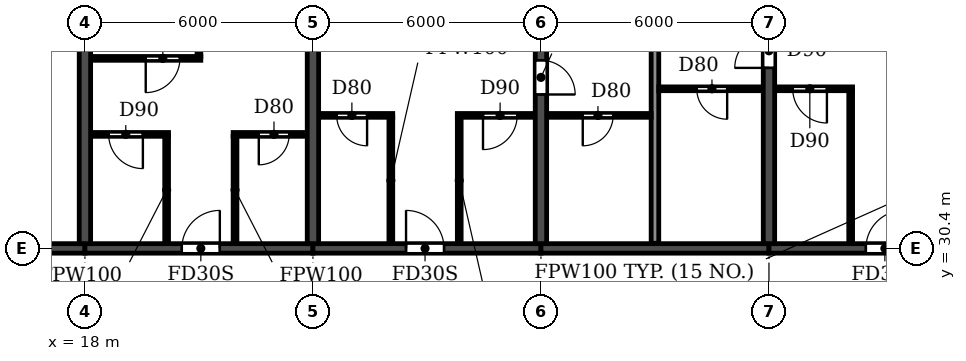
"""IFC4 building model, lengths in metres.
Left out: names, types, materials, properties, quantities, classifications, styles, units other than length and angle.
Written with IfcOpenShell. Run it as: python <this file> out.ifc"""

import sys

from ifc_helpers import new_model, si_unit, direction, frame, frame_2d, origin, place, context, subcontext, project, spatial, rectangle, extrude, element, fill, save


model = new_model("IFC4")
c1 = context("Model", 3, precision=1e-05, world=origin(), true_north=direction((0.0, 1.0)))
c2 = subcontext(c1, "Body", "Model", "MODEL_VIEW")
j1 = project(units=[si_unit("LENGTHUNIT", "METRE"), si_unit("PLANEANGLEUNIT", "RADIAN")], contexts=[c1])
p1 = place(None, origin())
s1 = spatial("IfcSite", under=j1, at=p1, CompositionType="ELEMENT")
p2 = place(p1, origin())
s2 = spatial("IfcBuilding", under=s1, at=p2, CompositionType="ELEMENT")
p3 = place(p2, frame((0.0, 0.0, 142.2)))
s3 = spatial("IfcBuildingStorey", under=s2, at=p3, CompositionType="ELEMENT", Elevation=142.2)
for number, where, z_axis, x_axis in (
    (1, (18.0, 30.525, 0.0), (0.0, 0.0, 1.0), (0.0, 1.0, 0.0)),
    (2, (24.0, 30.525, 0.0), (0.0, 0.0, 1.0), (0.0, 1.0, 0.0)),
):
    element("IfcWall", number, at=place(p3, frame(where, z_axis=z_axis, x_axis=x_axis)), inside=s3, PredefinedType="SHEAR", context=c2, shape_type="SweptSolid", body=[
        extrude(rectangle(XDim=11.675, YDim=0.3, at=frame_2d((5.837, 0.0))), origin(), (0.0, 0.0, 1.0), 3.07),
    ])
p4 = place(p3, frame((30.0, 30.525, 0.0), z_axis=(0.0, 0.0, 1.0), x_axis=(0.0, 1.0, 0.0)))
e3 = element("IfcWall", 3, at=p4, inside=s3, PredefinedType="SHEAR", context=c2, shape_type="SweptSolid", body=[
    extrude(rectangle(XDim=11.675, YDim=0.3, at=frame_2d((5.837, 0.0))), origin(), (0.0, 0.0, 1.0), 3.07),
])
p5 = place(p4, frame((3.925, 0.0, 0.0)))
e4 = element("IfcOpeningElement", 4, at=p5, cuts=e3, PredefinedType="OPENING", context=c2, shape_type="SweptSolid", body=[
    extrude(rectangle(XDim=0.9, YDim=2.1, at=frame_2d((0.45, 1.05))), frame((0.0, 0.16, 0.0), z_axis=(0.0, -1.0, 0.0), x_axis=(1.0, 0.0, 0.0)), (0.0, 0.0, 1.0), 0.32),
])
p6 = place(p3, frame((36.0, 30.525, 0.0), z_axis=(0.0, 0.0, 1.0), x_axis=(0.0, 1.0, 0.0)))
e5 = element("IfcWall", 5, at=p6, inside=s3, PredefinedType="SHEAR", context=c2, shape_type="SweptSolid", body=[
    extrude(rectangle(XDim=11.675, YDim=0.3, at=frame_2d((5.837, 0.0))), origin(), (0.0, 0.0, 1.0), 3.07),
])
p7 = place(p6, frame((4.625, 0.0, 0.0)))
e6 = element("IfcOpeningElement", 6, at=p7, cuts=e5, PredefinedType="OPENING", context=c2, shape_type="SweptSolid", body=[
    extrude(rectangle(XDim=0.9, YDim=2.1, at=frame_2d((0.45, 1.05))), frame((0.0, 0.16, 0.0), z_axis=(0.0, -1.0, 0.0), x_axis=(1.0, 0.0, 0.0)), (0.0, 0.0, 1.0), 0.32),
])
p8 = place(p3, frame((12.2, 30.4, 0.0), z_axis=(0.0, 0.0, 1.0), x_axis=(1.0, 0.0, 0.0)))
e7 = element("IfcWall", 7, at=p8, inside=s3, PredefinedType="SHEAR", context=c2, shape_type="SweptSolid", body=[
    extrude(rectangle(XDim=5.8, YDim=0.25, at=frame_2d((2.9, 0.0))), origin(), (0.0, 0.0, 1.0), 2.47),
])
p9 = place(p8, frame((2.3, 0.0, 0.0)))
e8 = element("IfcOpeningElement", 8, at=p9, cuts=e7, PredefinedType="OPENING", context=c2, shape_type="SweptSolid", body=[
    extrude(rectangle(XDim=1.0, YDim=2.1, at=frame_2d((0.5, 1.05))), frame((0.0, 0.135, 0.0), z_axis=(0.0, -1.0, 0.0), x_axis=(1.0, 0.0, 0.0)), (0.0, 0.0, 1.0), 0.27),
])
p10 = place(p3, frame((18.0, 30.4, 0.0), z_axis=(0.0, 0.0, 1.0), x_axis=(1.0, 0.0, 0.0)))
e9 = element("IfcWall", 9, at=p10, inside=s3, PredefinedType="SHEAR", context=c2, shape_type="SweptSolid", body=[
    extrude(rectangle(XDim=6.0, YDim=0.25, at=frame_2d((3.0, 0.0))), origin(), (0.0, 0.0, 1.0), 2.47),
])
p11 = place(p10, frame((2.55, 0.0, 0.0)))
e10 = element("IfcOpeningElement", 10, at=p11, cuts=e9, PredefinedType="OPENING", context=c2, shape_type="SweptSolid", body=[
    extrude(rectangle(XDim=1.0, YDim=2.1, at=frame_2d((0.5, 1.05))), frame((0.0, 0.135, 0.0), z_axis=(0.0, -1.0, 0.0), x_axis=(1.0, 0.0, 0.0)), (0.0, 0.0, 1.0), 0.27),
])
p12 = place(p3, frame((24.0, 30.4, 0.0), z_axis=(0.0, 0.0, 1.0), x_axis=(1.0, 0.0, 0.0)))
e11 = element("IfcWall", 11, at=p12, inside=s3, PredefinedType="SHEAR", context=c2, shape_type="SweptSolid", body=[
    extrude(rectangle(XDim=6.0, YDim=0.25, at=frame_2d((3.0, 0.0))), origin(), (0.0, 0.0, 1.0), 2.47),
])
p13 = place(p12, frame((2.45, 0.0, 0.0)))
e12 = element("IfcOpeningElement", 12, at=p13, cuts=e11, PredefinedType="OPENING", context=c2, shape_type="SweptSolid", body=[
    extrude(rectangle(XDim=1.0, YDim=2.1, at=frame_2d((0.5, 1.05))), frame((0.0, 0.135, 0.0), z_axis=(0.0, -1.0, 0.0), x_axis=(1.0, 0.0, 0.0)), (0.0, 0.0, 1.0), 0.27),
])
p14 = place(p3, frame((30.0, 30.4, 0.0), z_axis=(0.0, 0.0, 1.0), x_axis=(1.0, 0.0, 0.0)))
e13 = element("IfcWall", 13, at=p14, inside=s3, PredefinedType="SHEAR", context=c2, shape_type="SweptSolid", body=[
    extrude(rectangle(XDim=6.0, YDim=0.25, at=frame_2d((3.0, 0.0))), origin(), (0.0, 0.0, 1.0), 2.47),
])
p15 = place(p3, frame((36.0, 30.4, 0.0), z_axis=(0.0, 0.0, 1.0), x_axis=(1.0, 0.0, 0.0)))
e14 = element("IfcWall", 14, at=p15, inside=s3, PredefinedType="SHEAR", context=c2, shape_type="SweptSolid", body=[
    extrude(rectangle(XDim=6.0, YDim=0.25, at=frame_2d((3.0, 0.0))), origin(), (0.0, 0.0, 1.0), 2.47),
])
p16 = place(p15, frame((2.55, 0.0, 0.0)))
e15 = element("IfcOpeningElement", 15, at=p16, cuts=e14, PredefinedType="OPENING", context=c2, shape_type="SweptSolid", body=[
    extrude(rectangle(XDim=1.0, YDim=2.1, at=frame_2d((0.5, 1.05))), frame((0.0, 0.135, 0.0), z_axis=(0.0, -1.0, 0.0), x_axis=(1.0, 0.0, 0.0)), (0.0, 0.0, 1.0), 0.27),
])
p17 = place(p3, frame((33.0, 30.535, 0.0), z_axis=(0.0, 0.0, 1.0), x_axis=(0.0, 1.0, 0.0)))
e16 = element("IfcWall", 16, at=p17, inside=s3, PredefinedType="PARTITIONING", context=c2, shape_type="SweptSolid", body=[
    extrude(rectangle(XDim=11.805, YDim=0.2, at=frame_2d((5.903, 0.0))), origin(), (0.0, 0.0, 1.0), 3.07),
])
p18 = place(p3, frame((18.16, 33.4, 0.0), z_axis=(0.0, 0.0, 1.0), x_axis=(1.0, 0.0, 0.0)))
e17 = element("IfcWall", 17, at=p18, inside=s3, PredefinedType="PARTITIONING", context=c2, shape_type="SweptSolid", body=[
    extrude(rectangle(XDim=2.04, YDim=0.1, at=frame_2d((1.02, 0.0))), origin(), (0.0, 0.0, 1.0), 3.07),
])
p19 = place(p18, frame((0.465, 0.0, 0.0)))
e18 = element("IfcOpeningElement", 18, at=p19, cuts=e17, PredefinedType="OPENING", context=c2, shape_type="SweptSolid", body=[
    extrude(rectangle(XDim=0.9, YDim=2.1, at=frame_2d((0.45, 1.05))), frame((0.0, 0.06, 0.0), z_axis=(0.0, -1.0, 0.0), x_axis=(1.0, 0.0, 0.0)), (0.0, 0.0, 1.0), 0.12),
])
p20 = place(p3, frame((21.9, 33.4, 0.0), z_axis=(0.0, 0.0, 1.0), x_axis=(1.0, 0.0, 0.0)))
e19 = element("IfcWall", 19, at=p20, inside=s3, PredefinedType="PARTITIONING", context=c2, shape_type="SweptSolid", body=[
    extrude(rectangle(XDim=1.94, YDim=0.1, at=frame_2d((0.97, 0.0))), origin(), (0.0, 0.0, 1.0), 3.07),
])
p21 = place(p20, frame((0.675, 0.0, 0.0)))
e20 = element("IfcOpeningElement", 20, at=p21, cuts=e19, PredefinedType="OPENING", context=c2, shape_type="SweptSolid", body=[
    extrude(rectangle(XDim=0.8, YDim=2.1, at=frame_2d((0.4, 1.05))), frame((0.0, 0.06, 0.0), z_axis=(0.0, -1.0, 0.0), x_axis=(1.0, 0.0, 0.0)), (0.0, 0.0, 1.0), 0.12),
])
p22 = place(p3, frame((24.16, 33.9, 0.0), z_axis=(0.0, 0.0, 1.0), x_axis=(1.0, 0.0, 0.0)))
e21 = element("IfcWall", 21, at=p22, inside=s3, PredefinedType="PARTITIONING", context=c2, shape_type="SweptSolid", body=[
    extrude(rectangle(XDim=1.94, YDim=0.1, at=frame_2d((0.97, 0.0))), origin(), (0.0, 0.0, 1.0), 3.07),
])
p23 = place(p22, frame((0.465, 0.0, 0.0)))
e22 = element("IfcOpeningElement", 22, at=p23, cuts=e21, PredefinedType="OPENING", context=c2, shape_type="SweptSolid", body=[
    extrude(rectangle(XDim=0.8, YDim=2.1, at=frame_2d((0.4, 1.05))), frame((0.0, 0.06, 0.0), z_axis=(0.0, -1.0, 0.0), x_axis=(1.0, 0.0, 0.0)), (0.0, 0.0, 1.0), 0.12),
])
p24 = place(p3, frame((27.8, 33.9, 0.0), z_axis=(0.0, 0.0, 1.0), x_axis=(1.0, 0.0, 0.0)))
e23 = element("IfcWall", 23, at=p24, inside=s3, PredefinedType="PARTITIONING", context=c2, shape_type="SweptSolid", body=[
    extrude(rectangle(XDim=2.04, YDim=0.1, at=frame_2d((1.02, 0.0))), origin(), (0.0, 0.0, 1.0), 3.07),
])
p25 = place(p24, frame((0.675, 0.0, 0.0)))
e24 = element("IfcOpeningElement", 24, at=p25, cuts=e23, PredefinedType="OPENING", context=c2, shape_type="SweptSolid", body=[
    extrude(rectangle(XDim=0.9, YDim=2.1, at=frame_2d((0.45, 1.05))), frame((0.0, 0.06, 0.0), z_axis=(0.0, -1.0, 0.0), x_axis=(1.0, 0.0, 0.0)), (0.0, 0.0, 1.0), 0.12),
])
p26 = place(p3, frame((30.16, 33.9, 0.0), z_axis=(0.0, 0.0, 1.0), x_axis=(1.0, 0.0, 0.0)))
e25 = element("IfcWall", 25, at=p26, inside=s3, PredefinedType="PARTITIONING", context=c2, shape_type="SweptSolid", body=[
    extrude(rectangle(XDim=2.74, YDim=0.1, at=frame_2d((1.37, 0.0))), origin(), (0.0, 0.0, 1.0), 3.07),
])
p27 = place(p26, frame((0.94, 0.0, 0.0)))
e26 = element("IfcOpeningElement", 26, at=p27, cuts=e25, PredefinedType="OPENING", context=c2, shape_type="SweptSolid", body=[
    extrude(rectangle(XDim=0.8, YDim=2.1, at=frame_2d((0.4, 1.05))), frame((0.0, 0.06, 0.0), z_axis=(0.0, -1.0, 0.0), x_axis=(1.0, 0.0, 0.0)), (0.0, 0.0, 1.0), 0.12),
])
p28 = place(p3, frame((33.1, 34.6, 0.0), z_axis=(0.0, 0.0, 1.0), x_axis=(1.0, 0.0, 0.0)))
e27 = element("IfcWall", 27, at=p28, inside=s3, PredefinedType="PARTITIONING", context=c2, shape_type="SweptSolid", body=[
    extrude(rectangle(XDim=2.74, YDim=0.1, at=frame_2d((1.37, 0.0))), origin(), (0.0, 0.0, 1.0), 3.07),
])
p29 = place(p28, frame((1.0, 0.0, 0.0)))
e28 = element("IfcOpeningElement", 28, at=p29, cuts=e27, PredefinedType="OPENING", context=c2, shape_type="SweptSolid", body=[
    extrude(rectangle(XDim=0.8, YDim=2.1, at=frame_2d((0.4, 1.05))), frame((0.0, 0.06, 0.0), z_axis=(0.0, -1.0, 0.0), x_axis=(1.0, 0.0, 0.0)), (0.0, 0.0, 1.0), 0.12),
])
p30 = place(p3, frame((36.16, 34.6, 0.0), z_axis=(0.0, 0.0, 1.0), x_axis=(1.0, 0.0, 0.0)))
e29 = element("IfcWall", 29, at=p30, inside=s3, PredefinedType="PARTITIONING", context=c2, shape_type="SweptSolid", body=[
    extrude(rectangle(XDim=2.04, YDim=0.1, at=frame_2d((1.02, 0.0))), origin(), (0.0, 0.0, 1.0), 3.07),
])
p31 = place(p30, frame((0.465, 0.0, 0.0)))
e30 = element("IfcOpeningElement", 30, at=p31, cuts=e29, PredefinedType="OPENING", context=c2, shape_type="SweptSolid", body=[
    extrude(rectangle(XDim=0.9, YDim=2.1, at=frame_2d((0.45, 1.05))), frame((0.0, 0.06, 0.0), z_axis=(0.0, -1.0, 0.0), x_axis=(1.0, 0.0, 0.0)), (0.0, 0.0, 1.0), 0.12),
])
p32 = place(p3, frame((18.16, 35.4, 0.0), z_axis=(0.0, 0.0, 1.0), x_axis=(1.0, 0.0, 0.0)))
e31 = element("IfcWall", 31, at=p32, inside=s3, PredefinedType="PARTITIONING", context=c2, shape_type="SweptSolid", body=[
    extrude(rectangle(XDim=2.89, YDim=0.1, at=frame_2d((1.445, 0.0))), origin(), (0.0, 0.0, 1.0), 3.07),
])
p33 = place(p32, frame((1.44, 0.0, 0.0)))
e32 = element("IfcOpeningElement", 32, at=p33, cuts=e31, PredefinedType="OPENING", context=c2, shape_type="SweptSolid", body=[
    extrude(rectangle(XDim=0.9, YDim=2.1, at=frame_2d((0.45, 1.05))), frame((0.0, 0.06, 0.0), z_axis=(0.0, -1.0, 0.0), x_axis=(1.0, 0.0, 0.0)), (0.0, 0.0, 1.0), 0.12),
])
p34 = place(p3, frame((20.15, 30.535, 0.0), z_axis=(0.0, 0.0, 1.0), x_axis=(0.0, 1.0, 0.0)))
e33 = element("IfcWall", 33, at=p34, inside=s3, PredefinedType="PARTITIONING", context=c2, shape_type="SweptSolid", body=[
    extrude(rectangle(XDim=2.815, YDim=0.1, at=frame_2d((1.408, 0.0))), origin(), (0.0, 0.0, 1.0), 3.07),
])
p35 = place(p3, frame((21.0, 35.45, 0.0), z_axis=(0.0, 0.0, 1.0), x_axis=(0.0, 1.0, 0.0)))
e34 = element("IfcWall", 34, at=p35, inside=s3, PredefinedType="PARTITIONING", context=c2, shape_type="SweptSolid", body=[
    extrude(rectangle(XDim=6.89, YDim=0.1, at=frame_2d((3.445, 0.0))), origin(), (0.0, 0.0, 1.0), 3.07),
])
p36 = place(p3, frame((21.95, 30.535, 0.0), z_axis=(0.0, 0.0, 1.0), x_axis=(0.0, 1.0, 0.0)))
e35 = element("IfcWall", 35, at=p36, inside=s3, PredefinedType="PARTITIONING", context=c2, shape_type="SweptSolid", body=[
    extrude(rectangle(XDim=2.815, YDim=0.1, at=frame_2d((1.408, 0.0))), origin(), (0.0, 0.0, 1.0), 3.07),
])
for number, where, z_axis, x_axis in (
    (36, (26.05, 30.535, 0.0), (0.0, 0.0, 1.0), (0.0, 1.0, 0.0)),
    (37, (27.85, 30.535, 0.0), (0.0, 0.0, 1.0), (0.0, 1.0, 0.0)),
):
    element("IfcWall", number, at=place(p3, frame(where, z_axis=z_axis, x_axis=x_axis)), inside=s3, PredefinedType="PARTITIONING", context=c2, shape_type="SweptSolid", body=[
        extrude(rectangle(XDim=3.315, YDim=0.1, at=frame_2d((1.658, 0.0))), origin(), (0.0, 0.0, 1.0), 3.07),
    ])
p37 = place(p3, frame((38.15, 30.535, 0.0), z_axis=(0.0, 0.0, 1.0), x_axis=(0.0, 1.0, 0.0)))
e38 = element("IfcWall", 38, at=p37, inside=s3, PredefinedType="PARTITIONING", context=c2, shape_type="SweptSolid", body=[
    extrude(rectangle(XDim=4.015, YDim=0.1, at=frame_2d((2.008, 0.0))), origin(), (0.0, 0.0, 1.0), 3.07),
])
p38 = place(p19, frame((0.9, 0.0, 0.0), z_axis=(0.0, 0.0, 1.0), x_axis=(-1.0, 0.0, 0.0)))
e39 = element("IfcDoor", 39, at=p38, inside=s3, OperationType="SINGLE_SWING_LEFT", PredefinedType="DOOR", context=c2, shape_type="SweptSolid", body=[
    extrude(rectangle(XDim=0.9, YDim=2.1, at=frame_2d((0.45, 1.05))), frame((0.0, 0.025, 0.0), z_axis=(0.0, -1.0, 0.0), x_axis=(1.0, 0.0, 0.0)), (0.0, 0.0, 1.0), 0.05),
])
fill(e18, e39)
p39 = place(p33, frame((0.9, 0.0, 0.0), z_axis=(0.0, 0.0, 1.0), x_axis=(-1.0, 0.0, 0.0)))
e40 = element("IfcDoor", 40, at=p39, inside=s3, OperationType="SINGLE_SWING_RIGHT", PredefinedType="DOOR", context=c2, shape_type="SweptSolid", body=[
    extrude(rectangle(XDim=0.9, YDim=2.1, at=frame_2d((0.45, 1.05))), frame((0.0, 0.025, 0.0), z_axis=(0.0, -1.0, 0.0), x_axis=(1.0, 0.0, 0.0)), (0.0, 0.0, 1.0), 0.05),
])
fill(e32, e40)
p40 = place(p11, origin())
e41 = element("IfcDoor", 41, at=p40, inside=s3, OperationType="SINGLE_SWING_RIGHT", PredefinedType="DOOR", context=c2, shape_type="SweptSolid", body=[
    extrude(rectangle(XDim=1.0, YDim=2.1, at=frame_2d((0.5, 1.05))), frame((0.0, 0.025, 0.0), z_axis=(0.0, -1.0, 0.0), x_axis=(1.0, 0.0, 0.0)), (0.0, 0.0, 1.0), 0.05),
])
fill(e10, e41)
p41 = place(p21, frame((0.8, 0.0, 0.0), z_axis=(0.0, 0.0, 1.0), x_axis=(-1.0, 0.0, 0.0)))
e42 = element("IfcDoor", 42, at=p41, inside=s3, OperationType="SINGLE_SWING_RIGHT", PredefinedType="DOOR", context=c2, shape_type="SweptSolid", body=[
    extrude(rectangle(XDim=0.8, YDim=2.1, at=frame_2d((0.4, 1.05))), frame((0.0, 0.025, 0.0), z_axis=(0.0, -1.0, 0.0), x_axis=(1.0, 0.0, 0.0)), (0.0, 0.0, 1.0), 0.05),
])
fill(e20, e42)
p42 = place(p27, frame((0.8, 0.0, 0.0), z_axis=(0.0, 0.0, 1.0), x_axis=(-1.0, 0.0, 0.0)))
e43 = element("IfcDoor", 43, at=p42, inside=s3, OperationType="SINGLE_SWING_RIGHT", PredefinedType="DOOR", context=c2, shape_type="SweptSolid", body=[
    extrude(rectangle(XDim=0.8, YDim=2.1, at=frame_2d((0.4, 1.05))), frame((0.0, 0.025, 0.0), z_axis=(0.0, -1.0, 0.0), x_axis=(1.0, 0.0, 0.0)), (0.0, 0.0, 1.0), 0.05),
])
fill(e26, e43)
p43 = place(p23, frame((0.8, 0.0, 0.0), z_axis=(0.0, 0.0, 1.0), x_axis=(-1.0, 0.0, 0.0)))
e44 = element("IfcDoor", 44, at=p43, inside=s3, OperationType="SINGLE_SWING_LEFT", PredefinedType="DOOR", context=c2, shape_type="SweptSolid", body=[
    extrude(rectangle(XDim=0.8, YDim=2.1, at=frame_2d((0.4, 1.05))), frame((0.0, 0.025, 0.0), z_axis=(0.0, -1.0, 0.0), x_axis=(1.0, 0.0, 0.0)), (0.0, 0.0, 1.0), 0.05),
])
fill(e22, e44)
p44 = place(p13, origin())
e45 = element("IfcDoor", 45, at=p44, inside=s3, OperationType="SINGLE_SWING_LEFT", PredefinedType="DOOR", context=c2, shape_type="SweptSolid", body=[
    extrude(rectangle(XDim=1.0, YDim=2.1, at=frame_2d((0.5, 1.05))), frame((0.0, 0.025, 0.0), z_axis=(0.0, -1.0, 0.0), x_axis=(1.0, 0.0, 0.0)), (0.0, 0.0, 1.0), 0.05),
])
fill(e12, e45)
p45 = place(p25, frame((0.9, 0.0, 0.0), z_axis=(0.0, 0.0, 1.0), x_axis=(-1.0, 0.0, 0.0)))
e46 = element("IfcDoor", 46, at=p45, inside=s3, OperationType="SINGLE_SWING_RIGHT", PredefinedType="DOOR", context=c2, shape_type="SweptSolid", body=[
    extrude(rectangle(XDim=0.9, YDim=2.1, at=frame_2d((0.45, 1.05))), frame((0.0, 0.025, 0.0), z_axis=(0.0, -1.0, 0.0), x_axis=(1.0, 0.0, 0.0)), (0.0, 0.0, 1.0), 0.05),
])
fill(e24, e46)
p46 = place(p5, frame((0.9, 0.0, 0.0), z_axis=(0.0, 0.0, 1.0), x_axis=(-1.0, 0.0, 0.0)))
e47 = element("IfcDoor", 47, at=p46, inside=s3, OperationType="SINGLE_SWING_RIGHT", PredefinedType="DOOR", context=c2, shape_type="SweptSolid", body=[
    extrude(rectangle(XDim=0.9, YDim=2.1, at=frame_2d((0.45, 1.05))), frame((0.0, 0.025, 0.0), z_axis=(0.0, -1.0, 0.0), x_axis=(1.0, 0.0, 0.0)), (0.0, 0.0, 1.0), 0.05),
])
fill(e4, e47)
p47 = place(p29, frame((0.8, 0.0, 0.0), z_axis=(0.0, 0.0, 1.0), x_axis=(-1.0, 0.0, 0.0)))
e48 = element("IfcDoor", 48, at=p47, inside=s3, OperationType="SINGLE_SWING_LEFT", PredefinedType="DOOR", context=c2, shape_type="SweptSolid", body=[
    extrude(rectangle(XDim=0.8, YDim=2.1, at=frame_2d((0.4, 1.05))), frame((0.0, 0.025, 0.0), z_axis=(0.0, -1.0, 0.0), x_axis=(1.0, 0.0, 0.0)), (0.0, 0.0, 1.0), 0.05),
])
fill(e28, e48)
p48 = place(p7, origin())
e49 = element("IfcDoor", 49, at=p48, inside=s3, OperationType="SINGLE_SWING_LEFT", PredefinedType="DOOR", context=c2, shape_type="SweptSolid", body=[
    extrude(rectangle(XDim=0.9, YDim=2.1, at=frame_2d((0.45, 1.05))), frame((0.0, 0.025, 0.0), z_axis=(0.0, -1.0, 0.0), x_axis=(1.0, 0.0, 0.0)), (0.0, 0.0, 1.0), 0.05),
])
fill(e6, e49)
p49 = place(p31, frame((0.9, 0.0, 0.0), z_axis=(0.0, 0.0, 1.0), x_axis=(-1.0, 0.0, 0.0)))
e50 = element("IfcDoor", 50, at=p49, inside=s3, OperationType="SINGLE_SWING_LEFT", PredefinedType="DOOR", context=c2, shape_type="SweptSolid", body=[
    extrude(rectangle(XDim=0.9, YDim=2.1, at=frame_2d((0.45, 1.05))), frame((0.0, 0.025, 0.0), z_axis=(0.0, -1.0, 0.0), x_axis=(1.0, 0.0, 0.0)), (0.0, 0.0, 1.0), 0.05),
])
fill(e30, e50)
p50 = place(p16, origin())
e51 = element("IfcDoor", 51, at=p50, inside=s3, OperationType="SINGLE_SWING_RIGHT", PredefinedType="DOOR", context=c2, shape_type="SweptSolid", body=[
    extrude(rectangle(XDim=1.0, YDim=2.1, at=frame_2d((0.5, 1.05))), frame((0.0, 0.025, 0.0), z_axis=(0.0, -1.0, 0.0), x_axis=(1.0, 0.0, 0.0)), (0.0, 0.0, 1.0), 0.05),
])
fill(e15, e51)
save(model, sys.argv[1])
